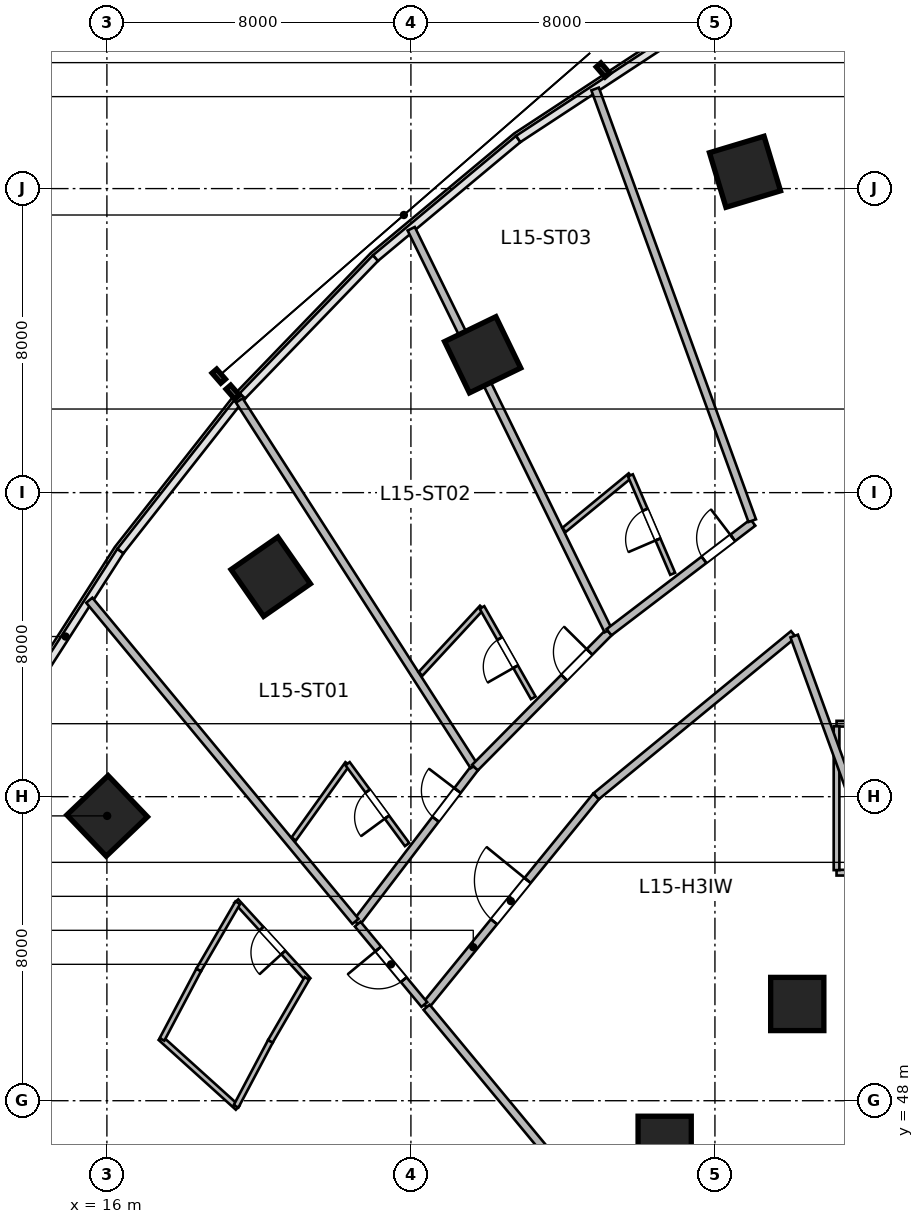
"""IFC4 building model, lengths in metres.
Left out: names, types, materials, properties, quantities, classifications, styles, units other than length and angle.
Written with IfcOpenShell. Run it as: python <this file> out.ifc"""

import sys

from ifc_helpers import new_model, si_unit, direction, frame, frame_2d, origin, origin_2d, place, context, subcontext, project, spatial, rectangle, circle, extrude, source, transform, mapped, element, fill, save


model = new_model("IFC4")
c1 = context("Model", 3, precision=1e-05, world=origin(), true_north=direction((0.0, 1.0)))
c2 = subcontext(c1, "Body", "Model", "MODEL_VIEW")
j1 = project(units=[si_unit("LENGTHUNIT", "METRE"), si_unit("PLANEANGLEUNIT", "RADIAN")], contexts=[c1])
p1 = place(None, origin())
s1 = spatial("IfcSite", under=j1, at=p1, CompositionType="ELEMENT")
p2 = place(p1, origin())
s2 = spatial("IfcBuilding", under=s1, at=p2, CompositionType="ELEMENT")
p3 = place(p2, frame((0.0, 0.0, 67.8)))
s3 = spatial("IfcBuildingStorey", under=s2, at=p3, CompositionType="ELEMENT", Elevation=67.8)
m1 = source(origin(), c2, "Body", "SweptSolid", [
    extrude(rectangle(XDim=1.5, YDim=1.5, at=origin_2d()), origin(), (0.0, 0.0, 1.0), 3.6),
])
p4 = place(p3, frame((16.007, 55.494, 0.0), z_axis=(0.0, 0.0, 1.0), x_axis=(-0.690756218984, 0.723087716626, 0.0)))
e1 = element("IfcColumn", 1, at=p4, inside=s3, PredefinedType="COLUMN", context=c2, shape_type="MappedRepresentation", body=[
    mapped(m1, transform((0.0, 0.0, 0.0), scale=1.0)),
])
m2 = source(origin(), c2, "Body", "SweptSolid", [
    extrude(circle(Radius=0.7, at=origin_2d()), origin(), (0.0, 0.0, 1.0), 3.6),
])
p5 = place(p3, frame((30.677, 46.892, 0.0), z_axis=(0.0, 0.0, 1.0), x_axis=(-0.571143442153, 0.820850271661, 0.0)))
e2 = element("IfcColumn", 2, at=p5, inside=s3, PredefinedType="COLUMN", context=c2, shape_type="MappedRepresentation", body=[
    mapped(m2, transform((0.0, 0.0, 0.0), scale=1.0)),
])
p6 = place(p3, frame((20.311, 61.789, 0.0), z_axis=(0.0, 0.0, 1.0), x_axis=(-0.571143442153, 0.820850271661, 0.0)))
e3 = element("IfcColumn", 3, at=p6, inside=s3, PredefinedType="COLUMN", context=c2, shape_type="MappedRepresentation", body=[
    mapped(m1, transform((0.0, 0.0, 0.0), scale=1.0)),
])
p7 = place(p3, frame((34.166, 50.545, 0.0), z_axis=(0.0, 0.0, 1.0), x_axis=(-0.436173672171, 0.899862504889, 0.0)))
e4 = element("IfcColumn", 4, at=p7, inside=s3, PredefinedType="COLUMN", context=c2, shape_type="MappedRepresentation", body=[
    mapped(m2, transform((0.0, 0.0, 0.0), scale=1.0)),
])
for number, where, z_axis, x_axis in (
    (5, (25.888, 67.627, 0.0), (0.0, 0.0, 1.0), (-0.436, 0.9, 0.0)),
    (6, (32.791, 72.442, 0.0), (0.0, 0.0, 1.0), (-0.289, 0.957, 0.0)),
):
    element("IfcColumn", number, at=place(p3, frame(where, z_axis=z_axis, x_axis=x_axis)), inside=s3, PredefinedType="COLUMN", context=c2, shape_type="MappedRepresentation", body=[
        mapped(m1, transform((0.0, 0.0, 0.0), scale=1.0)),
    ])
m3 = source(origin(), c2, "Body", "SweptSolid", [
    extrude(rectangle(XDim=6.6, YDim=0.15, at=frame_2d((3.3, 0.0))), origin(), (0.0, 0.0, 1.0), 2.803),
])
p8 = place(p3, frame((35.2, 54.0, 0.0), z_axis=(0.0, 0.0, 1.0), x_axis=(1.0, 0.0, 0.0)))
e7 = element("IfcWall", 7, at=p8, inside=s3, PredefinedType="PARTITIONING", context=c2, shape_type="MappedRepresentation", body=[
    mapped(m3, transform((0.0, 0.0, 0.0), scale=1.0)),
])
m4 = source(origin(), c2, "Body", "SweptSolid", [
    extrude(rectangle(XDim=6.6, YDim=0.15, at=frame_2d((3.3, 0.0))), origin(), (0.0, 0.0, 1.0), 3.36),
])
p9 = place(p3, frame((35.2, 57.92, 0.0), z_axis=(0.0, 0.0, 1.0), x_axis=(1.0, 0.0, 0.0)))
e8 = element("IfcWall", 8, at=p9, inside=s3, PredefinedType="PARTITIONING", context=c2, shape_type="MappedRepresentation", body=[
    mapped(m4, transform((0.0, 0.0, 0.0), scale=1.0)),
])
p10 = place(p9, frame((2.85, 0.0, 0.0)))
e9 = element("IfcOpeningElement", 9, at=p10, cuts=e8, PredefinedType="OPENING", context=c2, shape_type="SweptSolid", body=[
    extrude(rectangle(XDim=0.9, YDim=2.1, at=frame_2d((0.45, 1.05))), frame((0.0, 0.085, 0.0), z_axis=(0.0, -1.0, 0.0), x_axis=(1.0, 0.0, 0.0)), (0.0, 0.0, 1.0), 0.17),
])
m5 = source(origin(), c2, "Body", "SweptSolid", [
    extrude(rectangle(XDim=3.785, YDim=0.15, at=frame_2d((1.893, 0.0))), origin(), (0.0, 0.0, 1.0), 3.36),
])
p11 = place(p3, frame((35.2, 54.067, 0.0), z_axis=(0.0, 0.0, 1.0), x_axis=(0.0, 1.0, 0.0)))
e10 = element("IfcWall", 10, at=p11, inside=s3, PredefinedType="PARTITIONING", context=c2, shape_type="MappedRepresentation", body=[
    mapped(m5, transform((0.0, 0.0, 0.0), scale=1.0)),
])
m6 = source(origin(), c2, "Body", "SweptSolid", [
    extrude(rectangle(XDim=7.113, YDim=0.21, at=frame_2d((3.556, 0.0))), origin(), (0.0, 0.0, 1.0), 3.36),
])
p12 = place(p3, frame((24.383, 50.495, 0.0), z_axis=(0.0, 0.0, 1.0), x_axis=(0.63149032532, 0.775383755974, 0.0)))
e11 = element("IfcWall", 11, at=p12, inside=s3, PredefinedType="PARTITIONING", context=c2, shape_type="MappedRepresentation", body=[
    mapped(m6, transform((0.0, 0.0, 0.0), scale=1.0)),
])
p13 = place(p12, frame((2.856, 0.0, 0.0)))
e12 = element("IfcOpeningElement", 12, at=p13, cuts=e11, PredefinedType="OPENING", context=c2, shape_type="SweptSolid", body=[
    extrude(rectangle(XDim=1.4, YDim=2.15, at=frame_2d((0.7, 1.075))), frame((0.0, 0.115, 0.0), z_axis=(0.0, -1.0, 0.0), x_axis=(1.0, 0.0, 0.0)), (0.0, 0.0, 1.0), 0.23),
])
m7 = source(origin(), c2, "Body", "SweptSolid", [
    extrude(rectangle(XDim=6.721, YDim=0.21, at=frame_2d((3.361, 0.0))), origin(), (0.0, 0.0, 1.0), 3.36),
])
p14 = place(p3, frame((28.874, 56.01, 0.0), z_axis=(0.0, 0.0, 1.0), x_axis=(0.772828051199, 0.63461547671, 0.0)))
e13 = element("IfcWall", 13, at=p14, inside=s3, PredefinedType="PARTITIONING", context=c2, shape_type="MappedRepresentation", body=[
    mapped(m7, transform((0.0, 0.0, 0.0), scale=1.0)),
])
m8 = source(origin(), c2, "Body", "SweptSolid", [
    extrude(rectangle(XDim=11.053, YDim=0.21, at=frame_2d((5.527, 0.0))), origin(), (0.0, 0.0, 1.0), 3.36),
])
p15 = place(p3, frame((31.466, 41.949, 0.0), z_axis=(0.0, 0.0, 1.0), x_axis=(-0.638131235571, 0.769927611005, 0.0)))
e14 = element("IfcWall", 14, at=p15, inside=s3, PredefinedType="PARTITIONING", context=c2, shape_type="MappedRepresentation", body=[
    mapped(m8, transform((0.0, 0.0, 0.0), scale=1.0)),
])
m9 = source(origin(), c2, "Body", "SweptSolid", [
    extrude(rectangle(XDim=12.196, YDim=0.21, at=frame_2d((6.098, 0.0))), origin(), (0.0, 0.0, 1.0), 3.36),
])
p16 = place(p3, frame((38.258, 48.766, 0.0), z_axis=(0.0, 0.0, 1.0), x_axis=(-0.342022711534, 0.939691686031, 0.0)))
e15 = element("IfcWall", 15, at=p16, inside=s3, PredefinedType="PARTITIONING", context=c2, shape_type="MappedRepresentation", body=[
    mapped(m9, transform((0.0, 0.0, 0.0), scale=1.0)),
])
m10 = source(origin(), c2, "Body", "SweptSolid", [
    extrude(rectangle(XDim=5.135, YDim=0.21, at=frame_2d((2.567, 0.0))), origin(), (0.0, 0.0, 1.0), 3.36),
])
p17 = place(p3, frame((22.57, 52.683, 0.0), z_axis=(0.0, 0.0, 1.0), x_axis=(0.606802199649, 0.794852873494, 0.0)))
e16 = element("IfcWall", 16, at=p17, inside=s3, PredefinedType="PARTITIONING", context=c2, shape_type="MappedRepresentation", body=[
    mapped(m10, transform((0.0, 0.0, 0.0), scale=1.0)),
])
p18 = place(p17, frame((3.427, 0.0, 0.0)))
e17 = element("IfcOpeningElement", 17, at=p18, cuts=e16, PredefinedType="OPENING", context=c2, shape_type="SweptSolid", body=[
    extrude(rectangle(XDim=0.95, YDim=2.15, at=frame_2d((0.475, 1.075))), frame((0.0, 0.115, 0.0), z_axis=(0.0, -1.0, 0.0), x_axis=(1.0, 0.0, 0.0)), (0.0, 0.0, 1.0), 0.23),
])
m11 = source(origin(), c2, "Body", "SweptSolid", [
    extrude(rectangle(XDim=10.975, YDim=0.21, at=frame_2d((5.487, 0.0))), origin(), (0.0, 0.0, 1.0), 3.36),
])
p19 = place(p3, frame((22.54, 52.719, 0.0), z_axis=(0.0, 0.0, 1.0), x_axis=(-0.638125265812, 0.769932558821, 0.0)))
e18 = element("IfcWall", 18, at=p19, inside=s3, PredefinedType="PARTITIONING", context=c2, shape_type="MappedRepresentation", body=[
    mapped(m11, transform((0.0, 0.0, 0.0), scale=1.0)),
])
m12 = source(origin(), c2, "Body", "SweptSolid", [
    extrude(rectangle(XDim=11.432, YDim=0.21, at=frame_2d((5.716, 0.0))), origin(), (0.0, 0.0, 1.0), 3.36),
])
p20 = place(p3, frame((25.659, 56.805, 0.0), z_axis=(0.0, 0.0, 1.0), x_axis=(-0.540196183124, 0.841539115988, 0.0)))
e19 = element("IfcWall", 19, at=p20, inside=s3, PredefinedType="PARTITIONING", context=c2, shape_type="MappedRepresentation", body=[
    mapped(m12, transform((0.0, 0.0, 0.0), scale=1.0)),
])
m13 = source(origin(), c2, "Body", "SweptSolid", [
    extrude(rectangle(XDim=2.437, YDim=0.14, at=frame_2d((1.218, 0.0))), origin(), (0.0, 0.0, 1.0), 3.36),
])
p21 = place(p3, frame((20.915, 54.886, 0.0), z_axis=(0.0, 0.0, 1.0), x_axis=(0.581797219134, 0.813333877204, 0.0)))
e20 = element("IfcWall", 20, at=p21, inside=s3, PredefinedType="PARTITIONING", context=c2, shape_type="MappedRepresentation", body=[
    mapped(m13, transform((0.0, 0.0, 0.0), scale=1.0)),
])
m14 = source(origin(), c2, "Body", "SweptSolid", [
    extrude(rectangle(XDim=2.642, YDim=0.14, at=frame_2d((1.321, 0.0))), origin(), (0.0, 0.0, 1.0), 3.36),
])
p22 = place(p3, frame((23.899, 54.741, 0.0), z_axis=(0.0, 0.0, 1.0), x_axis=(-0.592789122423, 0.805357719487, 0.0)))
e21 = element("IfcWall", 21, at=p22, inside=s3, PredefinedType="PARTITIONING", context=c2, shape_type="MappedRepresentation", body=[
    mapped(m14, transform((0.0, 0.0, 0.0), scale=1.0)),
])
p23 = place(p22, frame((0.896, 0.0, 0.0)))
e22 = element("IfcOpeningElement", 22, at=p23, cuts=e21, PredefinedType="OPENING", context=c2, shape_type="SweptSolid", body=[
    extrude(rectangle(XDim=0.85, YDim=2.05, at=frame_2d((0.425, 1.025))), frame((0.0, 0.08, 0.0), z_axis=(0.0, -1.0, 0.0), x_axis=(1.0, 0.0, 0.0)), (0.0, 0.0, 1.0), 0.16),
])
m15 = source(origin(), c2, "Body", "SweptSolid", [
    extrude(rectangle(XDim=5.012, YDim=0.21, at=frame_2d((2.506, 0.0))), origin(), (0.0, 0.0, 1.0), 3.36),
])
p24 = place(p3, frame((25.685, 56.764, 0.0), z_axis=(0.0, 0.0, 1.0), x_axis=(0.703664626435, 0.710532260707, 0.0)))
e23 = element("IfcWall", 23, at=p24, inside=s3, PredefinedType="PARTITIONING", context=c2, shape_type="MappedRepresentation", body=[
    mapped(m15, transform((0.0, 0.0, 0.0), scale=1.0)),
])
p25 = place(p24, frame((3.335, 0.0, 0.0)))
e24 = element("IfcOpeningElement", 24, at=p25, cuts=e23, PredefinedType="OPENING", context=c2, shape_type="SweptSolid", body=[
    extrude(rectangle(XDim=0.95, YDim=2.15, at=frame_2d((0.475, 1.075))), frame((0.0, 0.115, 0.0), z_axis=(0.0, -1.0, 0.0), x_axis=(1.0, 0.0, 0.0)), (0.0, 0.0, 1.0), 0.23),
])
m16 = source(origin(), c2, "Body", "SweptSolid", [
    extrude(rectangle(XDim=11.775, YDim=0.21, at=frame_2d((5.887, 0.0))), origin(), (0.0, 0.0, 1.0), 2.644),
])
p26 = place(p3, frame((29.19, 60.371, 0.0), z_axis=(0.0, 0.0, 1.0), x_axis=(-0.4401500056, 0.897924257702, 0.0)))
e25 = element("IfcWall", 25, at=p26, inside=s3, PredefinedType="PARTITIONING", context=c2, shape_type="MappedRepresentation", body=[
    mapped(m16, transform((0.0, 0.0, 0.0), scale=1.0)),
])
m17 = source(origin(), c2, "Body", "SweptSolid", [
    extrude(rectangle(XDim=2.38, YDim=0.14, at=frame_2d((1.19, 0.0))), origin(), (0.0, 0.0, 1.0), 3.36),
])
p27 = place(p3, frame((24.253, 59.231, 0.0), z_axis=(0.0, 0.0, 1.0), x_axis=(0.679084816758, 0.734059814762, 0.0)))
e26 = element("IfcWall", 26, at=p27, inside=s3, PredefinedType="PARTITIONING", context=c2, shape_type="MappedRepresentation", body=[
    mapped(m17, transform((0.0, 0.0, 0.0), scale=1.0)),
])
m18 = source(origin(), c2, "Body", "SweptSolid", [
    extrude(rectangle(XDim=2.735, YDim=0.14, at=frame_2d((1.367, 0.0))), origin(), (0.0, 0.0, 1.0), 3.36),
])
p28 = place(p3, frame((27.219, 58.6, 0.0), z_axis=(0.0, 0.0, 1.0), x_axis=(-0.493694940578, 0.869635156631, 0.0)))
e27 = element("IfcWall", 27, at=p28, inside=s3, PredefinedType="PARTITIONING", context=c2, shape_type="MappedRepresentation", body=[
    mapped(m18, transform((0.0, 0.0, 0.0), scale=1.0)),
])
p29 = place(p28, frame((0.942, 0.0, 0.0)))
e28 = element("IfcOpeningElement", 28, at=p29, cuts=e27, PredefinedType="OPENING", context=c2, shape_type="SweptSolid", body=[
    extrude(rectangle(XDim=0.85, YDim=2.05, at=frame_2d((0.425, 1.025))), frame((0.0, 0.08, 0.0), z_axis=(0.0, -1.0, 0.0), x_axis=(1.0, 0.0, 0.0)), (0.0, 0.0, 1.0), 0.16),
])
m19 = source(origin(), c2, "Body", "SweptSolid", [
    extrude(rectangle(XDim=4.762, YDim=0.21, at=frame_2d((2.381, 0.0))), origin(), (0.0, 0.0, 1.0), 3.36),
])
p30 = place(p3, frame((29.212, 60.326, 0.0), z_axis=(0.0, 0.0, 1.0), x_axis=(0.795070295872, 0.60651729128, 0.0)))
e29 = element("IfcWall", 29, at=p30, inside=s3, PredefinedType="PARTITIONING", context=c2, shape_type="MappedRepresentation", body=[
    mapped(m19, transform((0.0, 0.0, 0.0), scale=1.0)),
])
p31 = place(p30, frame((3.144, 0.0, 0.0)))
e30 = element("IfcOpeningElement", 30, at=p31, cuts=e29, PredefinedType="OPENING", context=c2, shape_type="SweptSolid", body=[
    extrude(rectangle(XDim=0.95, YDim=2.15, at=frame_2d((0.475, 1.075))), frame((0.0, 0.115, 0.0), z_axis=(0.0, -1.0, 0.0), x_axis=(1.0, 0.0, 0.0)), (0.0, 0.0, 1.0), 0.23),
])
m20 = source(origin(), c2, "Body", "SweptSolid", [
    extrude(rectangle(XDim=12.088, YDim=0.21, at=frame_2d((6.044, 0.0))), origin(), (0.0, 0.0, 1.0), 3.36),
])
p32 = place(p3, frame((32.981, 63.262, 0.0), z_axis=(0.0, 0.0, 1.0), x_axis=(-0.34203007529, 0.939689005787, 0.0)))
e31 = element("IfcWall", 31, at=p32, inside=s3, PredefinedType="PARTITIONING", context=c2, shape_type="MappedRepresentation", body=[
    mapped(m20, transform((0.0, 0.0, 0.0), scale=1.0)),
])
m21 = source(origin(), c2, "Body", "SweptSolid", [
    extrude(rectangle(XDim=2.26, YDim=0.14, at=frame_2d((1.13, 0.0))), origin(), (0.0, 0.0, 1.0), 3.36),
])
p33 = place(p3, frame((28.029, 63.02, 0.0), z_axis=(0.0, 0.0, 1.0), x_axis=(0.772646789219, 0.634836151388, 0.0)))
e32 = element("IfcWall", 32, at=p33, inside=s3, PredefinedType="PARTITIONING", context=c2, shape_type="MappedRepresentation", body=[
    mapped(m21, transform((0.0, 0.0, 0.0), scale=1.0)),
])
m22 = source(origin(), c2, "Body", "SweptSolid", [
    extrude(rectangle(XDim=2.819, YDim=0.14, at=frame_2d((1.409, 0.0))), origin(), (0.0, 0.0, 1.0), 3.36),
])
p34 = place(p3, frame((30.888, 61.864, 0.0), z_axis=(0.0, 0.0, 1.0), x_axis=(-0.394420979357, 0.918929861874, 0.0)))
e33 = element("IfcWall", 33, at=p34, inside=s3, PredefinedType="PARTITIONING", context=c2, shape_type="MappedRepresentation", body=[
    mapped(m22, transform((0.0, 0.0, 0.0), scale=1.0)),
])
p35 = place(p34, frame((0.984, 0.0, 0.0)))
e34 = element("IfcOpeningElement", 34, at=p35, cuts=e33, PredefinedType="OPENING", context=c2, shape_type="SweptSolid", body=[
    extrude(rectangle(XDim=0.85, YDim=2.05, at=frame_2d((0.425, 1.025))), frame((0.0, 0.08, 0.0), z_axis=(0.0, -1.0, 0.0), x_axis=(1.0, 0.0, 0.0)), (0.0, 0.0, 1.0), 0.16),
])
m23 = source(origin(), c2, "Body", "SweptSolid", [
    extrude(rectangle(XDim=2.748, YDim=0.195, at=frame_2d((1.374, 0.0))), origin(), (0.0, 0.0, 1.0), 3.36),
])
p36 = place(p3, frame((24.353, 50.531, 0.0), z_axis=(0.0, 0.0, 1.0), x_axis=(-0.638111168284, 0.769944242729, 0.0)))
e35 = element("IfcWall", 35, at=p36, inside=s3, PredefinedType="PARTITIONING", context=c2, shape_type="MappedRepresentation", body=[
    mapped(m23, transform((0.0, 0.0, 0.0), scale=1.0)),
])
p37 = place(p36, frame((0.849, 0.0, 0.0)))
e36 = element("IfcOpeningElement", 36, at=p37, cuts=e35, PredefinedType="OPENING", context=c2, shape_type="SweptSolid", body=[
    extrude(rectangle(XDim=1.05, YDim=2.15, at=frame_2d((0.525, 1.075))), frame((0.0, 0.107, 0.0), z_axis=(0.0, -1.0, 0.0), x_axis=(1.0, 0.0, 0.0)), (0.0, 0.0, 1.0), 0.215),
])
m24 = source(origin(), c2, "Body", "SweptSolid", [
    extrude(rectangle(XDim=2.812, YDim=0.14, at=frame_2d((1.406, 0.0))), origin(), (0.0, 0.0, 1.0), 3.36),
])
p38 = place(p3, frame((21.303, 51.177, 0.0), z_axis=(0.0, 0.0, 1.0), x_axis=(-0.675119025852, 0.737708818527, 0.0)))
e37 = element("IfcWall", 37, at=p38, inside=s3, PredefinedType="PARTITIONING", context=c2, shape_type="MappedRepresentation", body=[
    mapped(m24, transform((0.0, 0.0, 0.0), scale=1.0)),
])
p39 = place(p38, frame((0.981, 0.0, 0.0)))
e38 = element("IfcOpeningElement", 38, at=p39, cuts=e37, PredefinedType="OPENING", context=c2, shape_type="SweptSolid", body=[
    extrude(rectangle(XDim=0.85, YDim=2.05, at=frame_2d((0.425, 1.025))), frame((0.0, 0.08, 0.0), z_axis=(0.0, -1.0, 0.0), x_axis=(1.0, 0.0, 0.0)), (0.0, 0.0, 1.0), 0.16),
])
m25 = source(origin(), c2, "Body", "SweptSolid", [
    extrude(rectangle(XDim=2.738, YDim=0.14, at=frame_2d((1.369, 0.0))), origin(), (0.0, 0.0, 1.0), 3.36),
])
p40 = place(p3, frame((19.44, 47.814, 0.0), z_axis=(0.0, 0.0, 1.0), x_axis=(-0.741873676582, 0.670539669218, 0.0)))
e39 = element("IfcWall", 39, at=p40, inside=s3, PredefinedType="PARTITIONING", context=c2, shape_type="MappedRepresentation", body=[
    mapped(m25, transform((0.0, 0.0, 0.0), scale=1.0)),
])
m26 = source(origin(), c2, "Body", "SweptSolid", [
    extrude(rectangle(XDim=1.936, YDim=0.14, at=frame_2d((0.968, 0.0))), origin(), (0.0, 0.0, 1.0), 3.36),
])
p41 = place(p3, frame((19.398, 47.852, 0.0), z_axis=(0.0, 0.0, 1.0), x_axis=(0.467174971862, 0.884164886017, 0.0)))
e40 = element("IfcWall", 40, at=p41, inside=s3, PredefinedType="PARTITIONING", context=c2, shape_type="MappedRepresentation", body=[
    mapped(m26, transform((0.0, 0.0, 0.0), scale=1.0)),
])
m27 = source(origin(), c2, "Body", "SweptSolid", [
    extrude(rectangle(XDim=2.068, YDim=0.14, at=frame_2d((1.034, 0.0))), origin(), (0.0, 0.0, 1.0), 3.36),
])
p42 = place(p3, frame((17.45, 49.612, 0.0), z_axis=(0.0, 0.0, 1.0), x_axis=(0.467215057643, 0.884143704333, 0.0)))
e41 = element("IfcWall", 41, at=p42, inside=s3, PredefinedType="PARTITIONING", context=c2, shape_type="MappedRepresentation", body=[
    mapped(m27, transform((0.0, 0.0, 0.0), scale=1.0)),
])
m28 = source(origin(), c2, "Body", "SweptSolid", [
    extrude(rectangle(XDim=1.914, YDim=0.14, at=frame_2d((0.957, 0.0))), origin(), (0.0, 0.0, 1.0), 3.36),
])
p43 = place(p3, frame((20.303, 49.563, 0.0), z_axis=(0.0, 0.0, 1.0), x_axis=(0.502347790612, 0.864665656347, 0.0)))
e42 = element("IfcWall", 42, at=p43, inside=s3, PredefinedType="PARTITIONING", context=c2, shape_type="MappedRepresentation", body=[
    mapped(m28, transform((0.0, 0.0, 0.0), scale=1.0)),
])
m29 = source(origin(), c2, "Body", "SweptSolid", [
    extrude(rectangle(XDim=2.045, YDim=0.14, at=frame_2d((1.022, 0.0))), origin(), (0.0, 0.0, 1.0), 3.36),
])
p44 = place(p3, frame((18.416, 51.441, 0.0), z_axis=(0.0, 0.0, 1.0), x_axis=(0.5023112139, 0.864686905411, 0.0)))
e43 = element("IfcWall", 43, at=p44, inside=s3, PredefinedType="PARTITIONING", context=c2, shape_type="MappedRepresentation", body=[
    mapped(m29, transform((0.0, 0.0, 0.0), scale=1.0)),
])
m30 = source(origin(), c2, "Body", "SweptSolid", [
    extrude(rectangle(XDim=1.4, YDim=2.15, at=frame_2d((0.7, 1.075))), frame((0.0, 0.025, 0.0), z_axis=(0.0, -1.0, 0.0), x_axis=(1.0, 0.0, 0.0)), (0.0, 0.0, 1.0), 0.05),
])
p45 = place(p13, origin())
e44 = element("IfcDoor", 44, at=p45, inside=s3, OperationType="SINGLE_SWING_RIGHT", PredefinedType="DOOR", context=c2, shape_type="MappedRepresentation", body=[
    mapped(m30, transform((0.0, 0.0, 0.0), scale=1.0)),
])
fill(e12, e44)
m31 = source(origin(), c2, "Body", "SweptSolid", [
    extrude(rectangle(XDim=0.95, YDim=2.15, at=frame_2d((0.475, 1.075))), frame((0.0, 0.025, 0.0), z_axis=(0.0, -1.0, 0.0), x_axis=(1.0, 0.0, 0.0)), (0.0, 0.0, 1.0), 0.05),
])
p46 = place(p18, origin())
e45 = element("IfcDoor", 45, at=p46, inside=s3, OperationType="SINGLE_SWING_RIGHT", PredefinedType="DOOR", context=c2, shape_type="MappedRepresentation", body=[
    mapped(m31, transform((0.0, 0.0, 0.0), scale=1.0)),
])
fill(e17, e45)
m32 = source(origin(), c2, "Body", "SweptSolid", [
    extrude(rectangle(XDim=0.85, YDim=2.05, at=frame_2d((0.425, 1.025))), frame((0.0, 0.025, 0.0), z_axis=(0.0, -1.0, 0.0), x_axis=(1.0, 0.0, 0.0)), (0.0, 0.0, 1.0), 0.05),
])
p47 = place(p23, origin())
e46 = element("IfcDoor", 46, at=p47, inside=s3, OperationType="SINGLE_SWING_LEFT", PredefinedType="DOOR", context=c2, shape_type="MappedRepresentation", body=[
    mapped(m32, transform((0.0, 0.0, 0.0), scale=1.0)),
])
fill(e22, e46)
p48 = place(p25, origin())
e47 = element("IfcDoor", 47, at=p48, inside=s3, OperationType="SINGLE_SWING_RIGHT", PredefinedType="DOOR", context=c2, shape_type="MappedRepresentation", body=[
    mapped(m31, transform((0.0, 0.0, 0.0), scale=1.0)),
])
fill(e24, e47)
p49 = place(p29, origin())
e48 = element("IfcDoor", 48, at=p49, inside=s3, OperationType="SINGLE_SWING_LEFT", PredefinedType="DOOR", context=c2, shape_type="MappedRepresentation", body=[
    mapped(m32, transform((0.0, 0.0, 0.0), scale=1.0)),
])
fill(e28, e48)
p50 = place(p31, origin())
e49 = element("IfcDoor", 49, at=p50, inside=s3, OperationType="SINGLE_SWING_RIGHT", PredefinedType="DOOR", context=c2, shape_type="MappedRepresentation", body=[
    mapped(m31, transform((0.0, 0.0, 0.0), scale=1.0)),
])
fill(e30, e49)
p51 = place(p35, origin())
e50 = element("IfcDoor", 50, at=p51, inside=s3, OperationType="SINGLE_SWING_LEFT", PredefinedType="DOOR", context=c2, shape_type="MappedRepresentation", body=[
    mapped(m32, transform((0.0, 0.0, 0.0), scale=1.0)),
])
fill(e34, e50)
m33 = source(origin(), c2, "Body", "SweptSolid", [
    extrude(rectangle(XDim=1.05, YDim=2.15, at=frame_2d((0.525, 1.075))), frame((0.0, 0.025, 0.0), z_axis=(0.0, -1.0, 0.0), x_axis=(1.0, 0.0, 0.0)), (0.0, 0.0, 1.0), 0.05),
])
p52 = place(p37, origin())
e51 = element("IfcDoor", 51, at=p52, inside=s3, OperationType="SINGLE_SWING_RIGHT", PredefinedType="DOOR", context=c2, shape_type="MappedRepresentation", body=[
    mapped(m33, transform((0.0, 0.0, 0.0), scale=1.0)),
])
fill(e36, e51)
p53 = place(p39, origin())
e52 = element("IfcDoor", 52, at=p53, inside=s3, OperationType="SINGLE_SWING_LEFT", PredefinedType="DOOR", context=c2, shape_type="MappedRepresentation", body=[
    mapped(m32, transform((0.0, 0.0, 0.0), scale=1.0)),
])
fill(e38, e52)
save(model, sys.argv[1])
